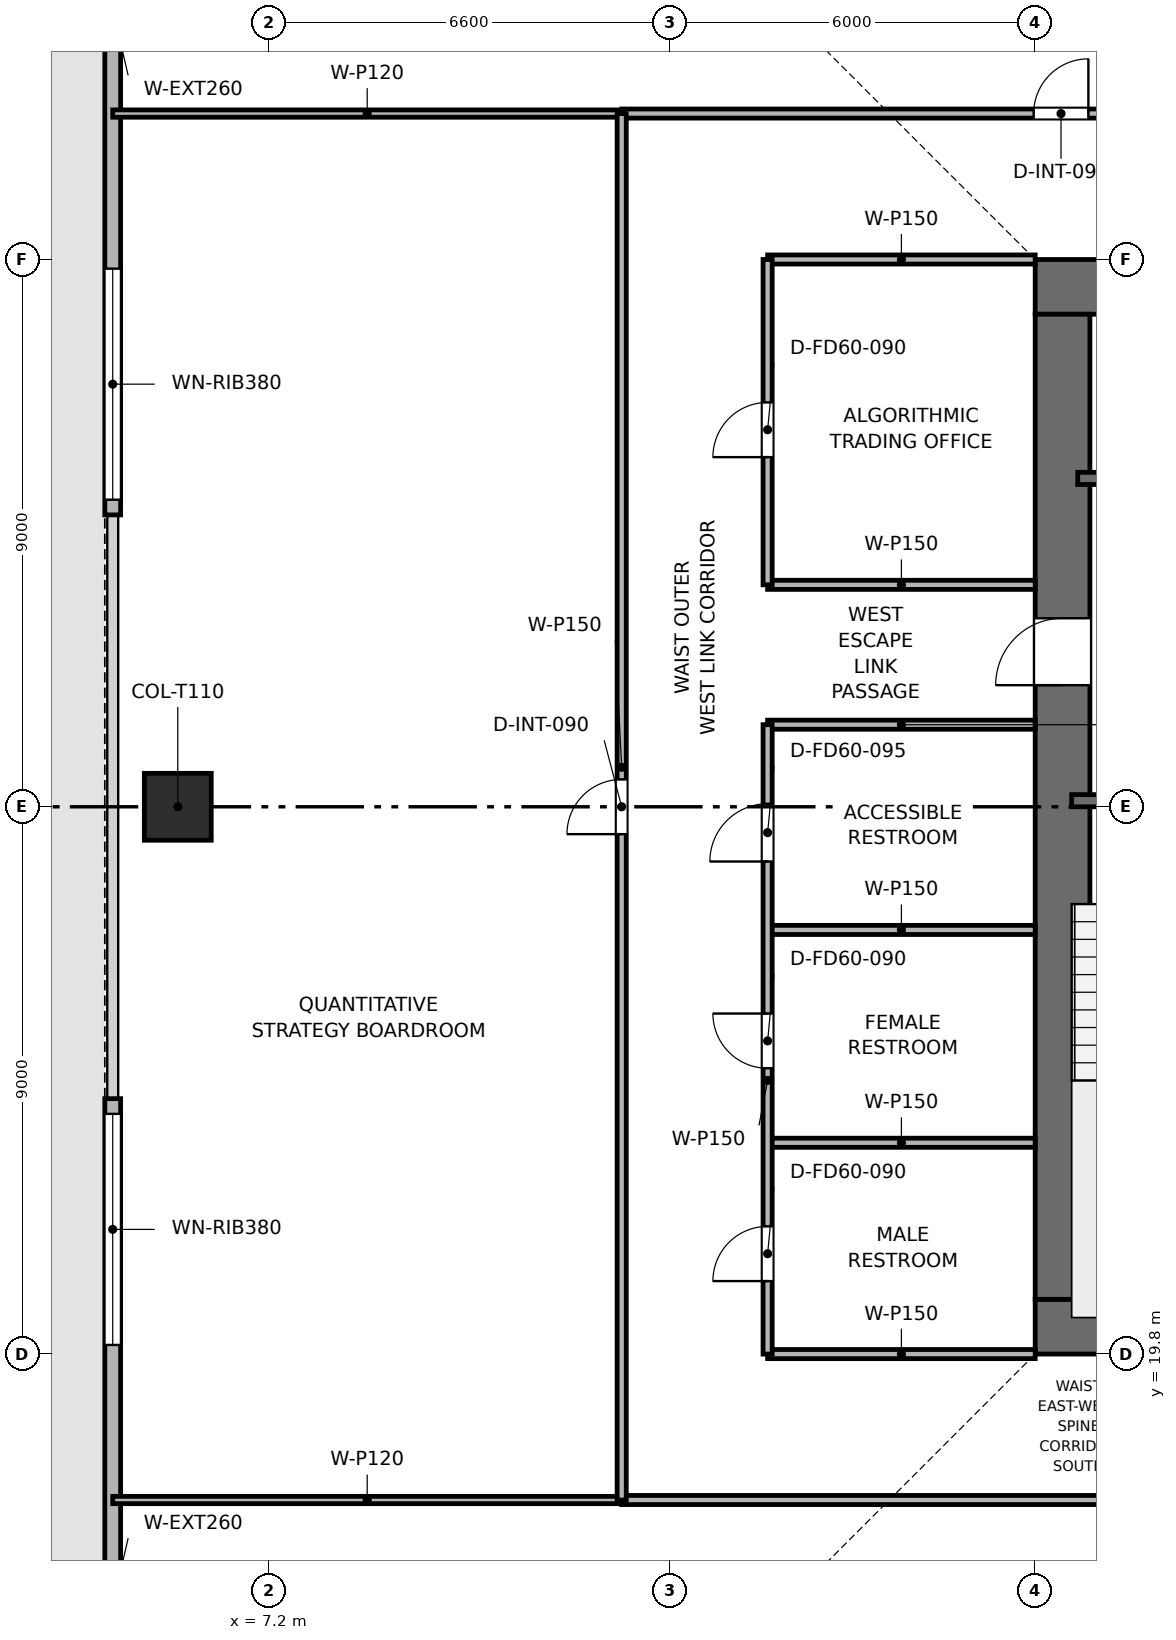
"""IFC4 building model, lengths in metres.
Left out: names, types, materials, properties, quantities, classifications, styles, units other than length and angle.
Written with IfcOpenShell. Run it as: python <this file> out.ifc"""

import sys

from ifc_helpers import new_model, si_unit, direction, frame, frame_2d, origin, origin_2d, place, context, subcontext, project, spatial, rectangle, extrude, element, fill, save


model = new_model("IFC4")
c1 = context("Model", 3, precision=1e-05, world=origin(), true_north=direction((0.0, 1.0)))
c2 = subcontext(c1, "Body", "Model", "MODEL_VIEW")
j1 = project(units=[si_unit("LENGTHUNIT", "METRE"), si_unit("PLANEANGLEUNIT", "RADIAN")], contexts=[c1])
p1 = place(None, origin())
s1 = spatial("IfcSite", under=j1, at=p1, CompositionType="ELEMENT")
p2 = place(p1, origin())
s2 = spatial("IfcBuilding", under=s1, at=p2, CompositionType="ELEMENT")
p3 = place(p2, frame((0.0, 0.0, 138.3)))
s3 = spatial("IfcBuildingStorey", under=s2, at=p3, CompositionType="ELEMENT", Elevation=138.3)
p4 = place(p3, frame((19.8, 20.25, 0.0), z_axis=(0.0, 0.0, 1.0), x_axis=(1.0, 0.0, 0.0)))
e1 = element("IfcWall", 1, at=p4, inside=s3, PredefinedType="SHEAR", context=c2, shape_type="SweptSolid", body=[
    extrude(rectangle(XDim=18.0, YDim=0.9, at=frame_2d((9.0, 0.0))), origin(), (0.0, 0.0, 1.0), 3.75),
])
p5 = place(p4, frame((8.4, 0.0, 0.0)))
e2 = element("IfcOpeningElement", 2, at=p5, cuts=e1, PredefinedType="OPENING", context=c2, shape_type="SweptSolid", body=[
    extrude(rectangle(XDim=1.2, YDim=2.2, at=frame_2d((0.6, 1.1))), frame((0.0, 0.46, 0.0), z_axis=(0.0, -1.0, 0.0), x_axis=(1.0, 0.0, 0.0)), (0.0, 0.0, 1.0), 0.92),
])
p6 = place(p3, frame((19.8, 37.35, 0.0), z_axis=(0.0, 0.0, 1.0), x_axis=(1.0, 0.0, 0.0)))
e3 = element("IfcWall", 3, at=p6, inside=s3, PredefinedType="SHEAR", context=c2, shape_type="SweptSolid", body=[
    extrude(rectangle(XDim=18.0, YDim=0.9, at=frame_2d((9.0, 0.0))), origin(), (0.0, 0.0, 1.0), 3.75),
])
p7 = place(p6, frame((7.05, 0.0, 0.0)))
e4 = element("IfcOpeningElement", 4, at=p7, cuts=e3, PredefinedType="OPENING", context=c2, shape_type="SweptSolid", body=[
    extrude(rectangle(XDim=1.1, YDim=2.15, at=frame_2d((0.55, 1.075))), frame((0.0, 0.46, 0.0), z_axis=(0.0, -1.0, 0.0), x_axis=(1.0, 0.0, 0.0)), (0.0, 0.0, 1.0), 0.92),
])
p8 = place(p3, frame((20.25, 20.7, 0.0), z_axis=(0.0, 0.0, 1.0), x_axis=(0.0, 1.0, 0.0)))
e5 = element("IfcWall", 5, at=p8, inside=s3, PredefinedType="SHEAR", context=c2, shape_type="SweptSolid", body=[
    extrude(rectangle(XDim=16.2, YDim=0.9, at=frame_2d((8.1, 0.0))), origin(), (0.0, 0.0, 1.0), 3.75),
])
p9 = place(p8, frame((10.1, 0.0, 0.0)))
e6 = element("IfcOpeningElement", 6, at=p9, cuts=e5, PredefinedType="OPENING", context=c2, shape_type="SweptSolid", body=[
    extrude(rectangle(XDim=1.1, YDim=2.15, at=frame_2d((0.55, 1.075))), frame((0.0, 0.46, 0.0), z_axis=(0.0, -1.0, 0.0), x_axis=(1.0, 0.0, 0.0)), (0.0, 0.0, 1.0), 0.92),
])
p10 = place(p3, frame((5.7, 28.8, 0.003), z_axis=(0.0, 0.0, 1.0), x_axis=(1.0, 0.0, 0.0)))
e7 = element("IfcColumn", 7, at=p10, inside=s3, PredefinedType="COLUMN", context=c2, shape_type="SweptSolid", body=[
    extrude(rectangle(XDim=1.1, YDim=1.1, at=origin_2d()), origin(), (0.0, 0.0, 1.0), 3.489),
])
p11 = place(p3, frame((4.63, 11.4, 0.0), z_axis=(0.0, 0.0, 1.0), x_axis=(0.0, 1.0, 0.0)))
e8 = element("IfcWall", 8, at=p11, inside=s3, PredefinedType="SOLIDWALL", context=c2, shape_type="SweptSolid", body=[
    extrude(rectangle(XDim=12.6, YDim=0.26, at=frame_2d((6.3, 0.0))), origin(), (0.0, 0.0, 1.0), 3.495),
])
p12 = place(p11, frame((8.55, 0.0, 0.9)))
e9 = element("IfcOpeningElement", 9, at=p12, cuts=e8, PredefinedType="OPENING", context=c2, shape_type="SweptSolid", body=[
    extrude(rectangle(XDim=3.8, YDim=1.9, at=frame_2d((1.9, 0.95))), frame((0.0, 0.14, 0.0), z_axis=(0.0, -1.0, 0.0), x_axis=(1.0, 0.0, 0.0)), (0.0, 0.0, 1.0), 0.28),
])
p13 = place(p3, frame((4.63, 33.6, 0.0), z_axis=(0.0, 0.0, 1.0), x_axis=(0.0, 1.0, 0.0)))
e10 = element("IfcWall", 10, at=p13, inside=s3, PredefinedType="SOLIDWALL", context=c2, shape_type="SweptSolid", body=[
    extrude(rectangle(XDim=12.6, YDim=0.26, at=frame_2d((6.3, 0.0))), origin(), (0.0, 0.0, 1.0), 3.495),
])
p14 = place(p13, frame((0.25, 0.0, 0.9)))
e11 = element("IfcOpeningElement", 11, at=p14, cuts=e10, PredefinedType="OPENING", context=c2, shape_type="SweptSolid", body=[
    extrude(rectangle(XDim=3.8, YDim=1.9, at=frame_2d((1.9, 0.95))), frame((0.0, 0.14, 0.0), z_axis=(0.0, -1.0, 0.0), x_axis=(1.0, 0.0, 0.0)), (0.0, 0.0, 1.0), 0.28),
])
p15 = place(p3, frame((20.4, 28.9, 0.0), z_axis=(0.0, 0.0, 1.0), x_axis=(1.0, 0.0, 0.0)))
e12 = element("IfcWall", 12, at=p15, inside=s3, PredefinedType="SHEAR", context=c2, shape_type="SweptSolid", body=[
    extrude(rectangle(XDim=3.15, YDim=0.2, at=frame_2d((1.575, 0.0))), origin(), (0.0, 0.0, 1.0), 3.495),
])
p16 = place(p15, frame((0.8, 0.0, 0.0)))
e13 = element("IfcOpeningElement", 13, at=p16, cuts=e12, PredefinedType="OPENING", context=c2, shape_type="SweptSolid", body=[
    extrude(rectangle(XDim=1.0, YDim=2.1, at=frame_2d((0.5, 1.05))), frame((0.0, 0.11, 0.0), z_axis=(0.0, -1.0, 0.0), x_axis=(1.0, 0.0, 0.0)), (0.0, 0.0, 1.0), 0.22),
])
p17 = place(p3, frame((20.5, 34.2, 0.0), z_axis=(0.0, 0.0, 1.0), x_axis=(1.0, 0.0, 0.0)))
e14 = element("IfcWall", 14, at=p17, inside=s3, PredefinedType="SHEAR", context=c2, shape_type="SweptSolid", body=[
    extrude(rectangle(XDim=3.05, YDim=0.2, at=frame_2d((1.525, 0.0))), origin(), (0.0, 0.0, 1.0), 3.495),
])
p18 = place(p17, frame((0.75, 0.0, 0.0)))
e15 = element("IfcOpeningElement", 15, at=p18, cuts=e14, PredefinedType="OPENING", context=c2, shape_type="SweptSolid", body=[
    extrude(rectangle(XDim=1.1, YDim=2.15, at=frame_2d((0.55, 1.075))), frame((0.0, 0.11, 0.0), z_axis=(0.0, -1.0, 0.0), x_axis=(1.0, 0.0, 0.0)), (0.0, 0.0, 1.0), 0.22),
])
p19 = place(p3, frame((15.4, 19.8, 0.0), z_axis=(0.0, 0.0, 1.0), x_axis=(1.0, 0.0, 0.0)))
e16 = element("IfcWall", 16, at=p19, inside=s3, PredefinedType="PARTITIONING", context=c2, shape_type="SweptSolid", body=[
    extrude(rectangle(XDim=4.4, YDim=0.15, at=frame_2d((2.2, 0.0))), origin(), (0.0, 0.0, 1.0), 3.03),
])
for number, where, z_axis, x_axis in (
    (17, (15.4, 23.275, 0.0), (0.0, 0.0, 1.0), (1.0, 0.0, 0.0)),
    (18, (15.4, 26.775, 0.0), (0.0, 0.0, 1.0), (1.0, 0.0, 0.0)),
    (19, (15.4, 30.15, 0.0), (0.0, 0.0, 1.0), (1.0, 0.0, 0.0)),
    (20, (15.4, 32.45, 0.0), (0.0, 0.0, 1.0), (1.0, 0.0, 0.0)),
):
    element("IfcWall", number, at=place(p3, frame(where, z_axis=z_axis, x_axis=x_axis)), inside=s3, PredefinedType="PARTITIONING", context=c2, shape_type="SweptSolid", body=[
        extrude(rectangle(XDim=4.4, YDim=0.15, at=frame_2d((2.2, 0.0))), origin(), (0.0, 0.0, 1.0), 3.495),
    ])
p20 = place(p3, frame((15.4, 37.8, 0.0), z_axis=(0.0, 0.0, 1.0), x_axis=(1.0, 0.0, 0.0)))
e21 = element("IfcWall", 21, at=p20, inside=s3, PredefinedType="PARTITIONING", context=c2, shape_type="SweptSolid", body=[
    extrude(rectangle(XDim=4.4, YDim=0.15, at=frame_2d((2.2, 0.0))), origin(), (0.0, 0.0, 1.0), 3.03),
])
p21 = place(p3, frame((15.4, 19.8, 0.0), z_axis=(0.0, 0.0, 1.0), x_axis=(0.0, 1.0, 0.0)))
e22 = element("IfcWall", 22, at=p21, inside=s3, PredefinedType="PARTITIONING", context=c2, shape_type="SweptSolid", body=[
    extrude(rectangle(XDim=10.35, YDim=0.15, at=frame_2d((5.175, 0.0))), origin(), (0.0, 0.0, 1.0), 3.03),
])
p22 = place(p21, frame((1.2, 0.0, 0.0)))
e23 = element("IfcOpeningElement", 23, at=p22, cuts=e22, PredefinedType="OPENING", context=c2, shape_type="SweptSolid", body=[
    extrude(rectangle(XDim=0.9, YDim=2.1, at=frame_2d((0.45, 1.05))), frame((0.0, 0.085, 0.0), z_axis=(0.0, -1.0, 0.0), x_axis=(1.0, 0.0, 0.0)), (0.0, 0.0, 1.0), 0.17),
])
p23 = place(p21, frame((4.7, 0.0, 0.0)))
e24 = element("IfcOpeningElement", 24, at=p23, cuts=e22, PredefinedType="OPENING", context=c2, shape_type="SweptSolid", body=[
    extrude(rectangle(XDim=0.9, YDim=2.1, at=frame_2d((0.45, 1.05))), frame((0.0, 0.085, 0.0), z_axis=(0.0, -1.0, 0.0), x_axis=(1.0, 0.0, 0.0)), (0.0, 0.0, 1.0), 0.17),
])
p24 = place(p21, frame((8.1, 0.0, 0.0)))
e25 = element("IfcOpeningElement", 25, at=p24, cuts=e22, PredefinedType="OPENING", context=c2, shape_type="SweptSolid", body=[
    extrude(rectangle(XDim=0.95, YDim=2.1, at=frame_2d((0.475, 1.05))), frame((0.0, 0.085, 0.0), z_axis=(0.0, -1.0, 0.0), x_axis=(1.0, 0.0, 0.0)), (0.0, 0.0, 1.0), 0.17),
])
p25 = place(p3, frame((15.4, 32.45, 0.0), z_axis=(0.0, 0.0, 1.0), x_axis=(0.0, 1.0, 0.0)))
e26 = element("IfcWall", 26, at=p25, inside=s3, PredefinedType="PARTITIONING", context=c2, shape_type="SweptSolid", body=[
    extrude(rectangle(XDim=5.35, YDim=0.15, at=frame_2d((2.675, 0.0))), origin(), (0.0, 0.0, 1.0), 3.03),
])
p26 = place(p25, frame((2.1, 0.0, 0.0)))
e27 = element("IfcOpeningElement", 27, at=p26, cuts=e26, PredefinedType="OPENING", context=c2, shape_type="SweptSolid", body=[
    extrude(rectangle(XDim=0.9, YDim=2.1, at=frame_2d((0.45, 1.05))), frame((0.0, 0.085, 0.0), z_axis=(0.0, -1.0, 0.0), x_axis=(1.0, 0.0, 0.0)), (0.0, 0.0, 1.0), 0.17),
])
for number, where, z_axis, x_axis in (
    (28, (4.63, 17.4, 0.0), (0.0, 0.0, 1.0), (1.0, 0.0, 0.0)),
    (29, (4.63, 40.2, 0.0), (0.0, 0.0, 1.0), (1.0, 0.0, 0.0)),
):
    element("IfcWall", number, at=place(p3, frame(where, z_axis=z_axis, x_axis=x_axis)), inside=s3, PredefinedType="PARTITIONING", context=c2, shape_type="SweptSolid", body=[
        extrude(rectangle(XDim=8.37, YDim=0.12, at=frame_2d((4.185, 0.0))), origin(), (0.0, 0.0, 1.0), 2.98),
    ])
p27 = place(p3, frame((13.0, 17.4, 0.0), z_axis=(0.0, 0.0, 1.0), x_axis=(1.0, 0.0, 0.0)))
e30 = element("IfcWall", 30, at=p27, inside=s3, PredefinedType="PARTITIONING", context=c2, shape_type="SweptSolid", body=[
    extrude(rectangle(XDim=31.6, YDim=0.15, at=frame_2d((15.8, 0.0))), origin(), (0.0, 0.0, 1.0), 3.03),
])
p28 = place(p27, frame((15.35, 0.0, 0.0)))
e31 = element("IfcOpeningElement", 31, at=p28, cuts=e30, PredefinedType="OPENING", context=c2, shape_type="SweptSolid", body=[
    extrude(rectangle(XDim=0.9, YDim=2.1, at=frame_2d((0.45, 1.05))), frame((0.0, 0.085, 0.0), z_axis=(0.0, -1.0, 0.0), x_axis=(1.0, 0.0, 0.0)), (0.0, 0.0, 1.0), 0.17),
])
p29 = place(p3, frame((13.0, 40.2, 0.0), z_axis=(0.0, 0.0, 1.0), x_axis=(1.0, 0.0, 0.0)))
e32 = element("IfcWall", 32, at=p29, inside=s3, PredefinedType="PARTITIONING", context=c2, shape_type="SweptSolid", body=[
    extrude(rectangle(XDim=31.6, YDim=0.15, at=frame_2d((15.8, 0.0))), origin(), (0.0, 0.0, 1.0), 3.03),
])
p30 = place(p29, frame((6.775, 0.0, 0.0)))
e33 = element("IfcOpeningElement", 33, at=p30, cuts=e32, PredefinedType="OPENING", context=c2, shape_type="SweptSolid", body=[
    extrude(rectangle(XDim=0.9, YDim=2.1, at=frame_2d((0.45, 1.05))), frame((0.0, 0.085, 0.0), z_axis=(0.0, -1.0, 0.0), x_axis=(1.0, 0.0, 0.0)), (0.0, 0.0, 1.0), 0.17),
])
p31 = place(p29, frame((22.575, 0.0, 0.0)))
e34 = element("IfcOpeningElement", 34, at=p31, cuts=e32, PredefinedType="OPENING", context=c2, shape_type="SweptSolid", body=[
    extrude(rectangle(XDim=0.9, YDim=2.1, at=frame_2d((0.45, 1.05))), frame((0.0, 0.085, 0.0), z_axis=(0.0, -1.0, 0.0), x_axis=(1.0, 0.0, 0.0)), (0.0, 0.0, 1.0), 0.17),
])
p32 = place(p3, frame((13.0, 17.4, 0.0), z_axis=(0.0, 0.0, 1.0), x_axis=(0.0, 1.0, 0.0)))
e35 = element("IfcWall", 35, at=p32, inside=s3, PredefinedType="PARTITIONING", context=c2, shape_type="SweptSolid", body=[
    extrude(rectangle(XDim=22.8, YDim=0.15, at=frame_2d((11.4, 0.0))), origin(), (0.0, 0.0, 1.0), 3.03),
])
p33 = place(p32, frame((10.95, 0.0, 0.0)))
e36 = element("IfcOpeningElement", 36, at=p33, cuts=e35, PredefinedType="OPENING", context=c2, shape_type="SweptSolid", body=[
    extrude(rectangle(XDim=0.9, YDim=2.1, at=frame_2d((0.45, 1.05))), frame((0.0, 0.085, 0.0), z_axis=(0.0, -1.0, 0.0), x_axis=(1.0, 0.0, 0.0)), (0.0, 0.0, 1.0), 0.17),
])
p34 = place(p12, origin())
e37 = element("IfcWindow", 37, at=p34, inside=s3, PartitioningType="SINGLE_PANEL", PredefinedType="WINDOW", context=c2, shape_type="SweptSolid", body=[
    extrude(rectangle(XDim=3.8, YDim=1.9, at=frame_2d((1.9, 0.95))), frame((0.0, 0.03, 0.0), z_axis=(0.0, -1.0, 0.0), x_axis=(1.0, 0.0, 0.0)), (0.0, 0.0, 1.0), 0.06),
])
fill(e9, e37)
p35 = place(p14, origin())
e38 = element("IfcWindow", 38, at=p35, inside=s3, PartitioningType="SINGLE_PANEL", PredefinedType="WINDOW", context=c2, shape_type="SweptSolid", body=[
    extrude(rectangle(XDim=3.8, YDim=1.9, at=frame_2d((1.9, 0.95))), frame((0.0, 0.03, 0.0), z_axis=(0.0, -1.0, 0.0), x_axis=(1.0, 0.0, 0.0)), (0.0, 0.0, 1.0), 0.06),
])
fill(e11, e38)
p36 = place(p22, origin())
e39 = element("IfcDoor", 39, at=p36, inside=s3, OperationType="SINGLE_SWING_LEFT", PredefinedType="DOOR", context=c2, shape_type="SweptSolid", body=[
    extrude(rectangle(XDim=0.9, YDim=2.1, at=frame_2d((0.45, 1.05))), frame((0.0, 0.025, 0.0), z_axis=(0.0, -1.0, 0.0), x_axis=(1.0, 0.0, 0.0)), (0.0, 0.0, 1.0), 0.05),
])
fill(e23, e39)
p37 = place(p23, origin())
e40 = element("IfcDoor", 40, at=p37, inside=s3, OperationType="SINGLE_SWING_RIGHT", PredefinedType="DOOR", context=c2, shape_type="SweptSolid", body=[
    extrude(rectangle(XDim=0.9, YDim=2.1, at=frame_2d((0.45, 1.05))), frame((0.0, 0.025, 0.0), z_axis=(0.0, -1.0, 0.0), x_axis=(1.0, 0.0, 0.0)), (0.0, 0.0, 1.0), 0.05),
])
fill(e24, e40)
p38 = place(p24, origin())
e41 = element("IfcDoor", 41, at=p38, inside=s3, OperationType="SINGLE_SWING_LEFT", PredefinedType="DOOR", context=c2, shape_type="SweptSolid", body=[
    extrude(rectangle(XDim=0.95, YDim=2.1, at=frame_2d((0.475, 1.05))), frame((0.0, 0.025, 0.0), z_axis=(0.0, -1.0, 0.0), x_axis=(1.0, 0.0, 0.0)), (0.0, 0.0, 1.0), 0.05),
])
fill(e25, e41)
p39 = place(p26, origin())
e42 = element("IfcDoor", 42, at=p39, inside=s3, OperationType="SINGLE_SWING_LEFT", PredefinedType="DOOR", context=c2, shape_type="SweptSolid", body=[
    extrude(rectangle(XDim=0.9, YDim=2.1, at=frame_2d((0.45, 1.05))), frame((0.0, 0.025, 0.0), z_axis=(0.0, -1.0, 0.0), x_axis=(1.0, 0.0, 0.0)), (0.0, 0.0, 1.0), 0.05),
])
fill(e27, e42)
p40 = place(p30, origin())
e43 = element("IfcDoor", 43, at=p40, inside=s3, OperationType="SINGLE_SWING_RIGHT", PredefinedType="DOOR", context=c2, shape_type="SweptSolid", body=[
    extrude(rectangle(XDim=0.9, YDim=2.1, at=frame_2d((0.45, 1.05))), frame((0.0, 0.025, 0.0), z_axis=(0.0, -1.0, 0.0), x_axis=(1.0, 0.0, 0.0)), (0.0, 0.0, 1.0), 0.05),
])
fill(e33, e43)
p41 = place(p33, origin())
e44 = element("IfcDoor", 44, at=p41, inside=s3, OperationType="SINGLE_SWING_LEFT", PredefinedType="DOOR", context=c2, shape_type="SweptSolid", body=[
    extrude(rectangle(XDim=0.9, YDim=2.1, at=frame_2d((0.45, 1.05))), frame((0.0, 0.025, 0.0), z_axis=(0.0, -1.0, 0.0), x_axis=(1.0, 0.0, 0.0)), (0.0, 0.0, 1.0), 0.05),
])
fill(e36, e44)
p42 = place(p9, origin())
e45 = element("IfcDoor", 45, at=p42, inside=s3, OperationType="SINGLE_SWING_LEFT", PredefinedType="DOOR", context=c2, shape_type="SweptSolid", body=[
    extrude(rectangle(XDim=1.1, YDim=2.15, at=frame_2d((0.55, 1.075))), frame((0.0, 0.025, 0.0), z_axis=(0.0, -1.0, 0.0), x_axis=(1.0, 0.0, 0.0)), (0.0, 0.0, 1.0), 0.05),
])
fill(e6, e45)
save(model, sys.argv[1])
